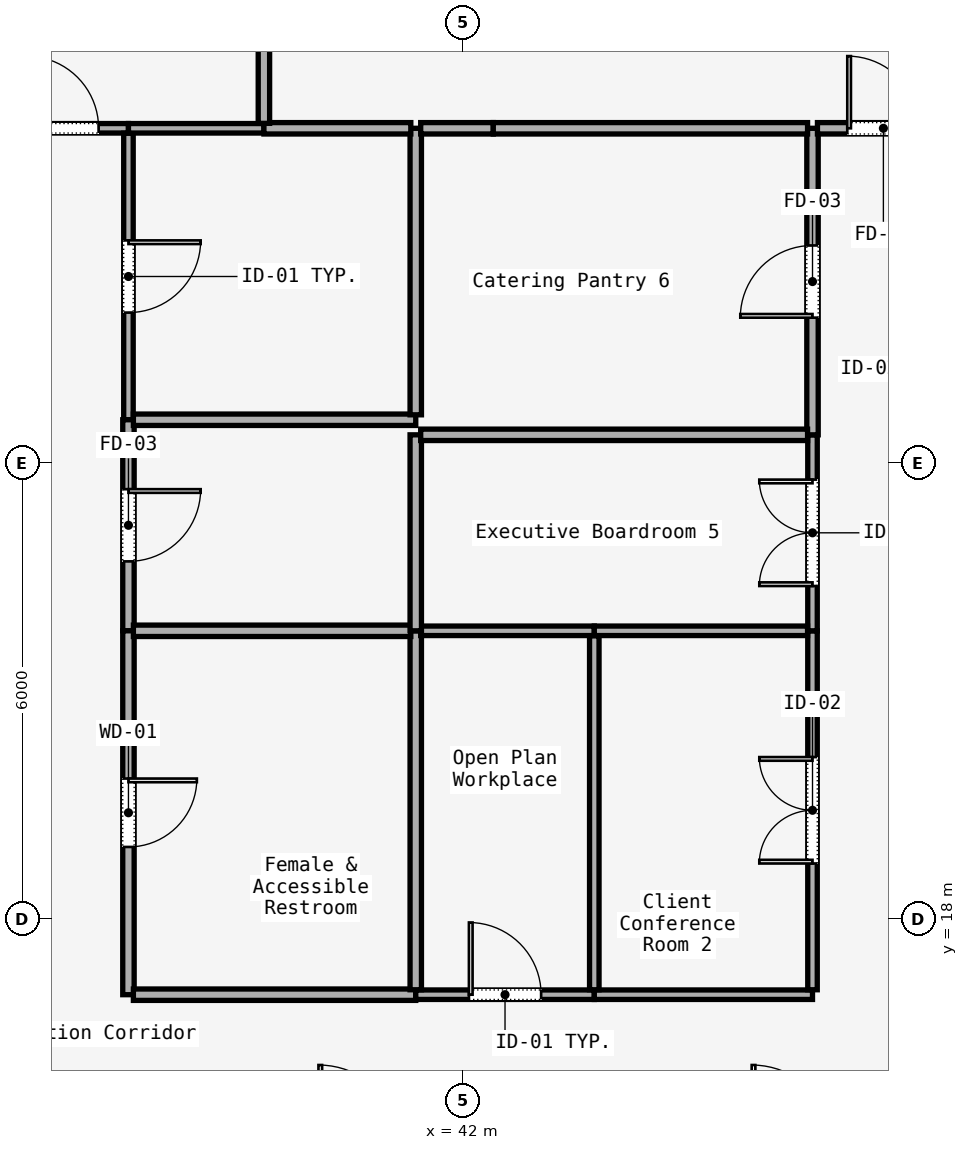
"""IFC4 building model, lengths in metres.
Left out: names, types, materials, properties, quantities, classifications, styles, units other than length and angle.
Written with IfcOpenShell. Run it as: python <this file> out.ifc"""

import sys

from ifc_helpers import new_model, si_unit, direction, frame, frame_2d, origin, place, context, subcontext, project, spatial, rectangle, extrude, element, fill, save


model = new_model("IFC4")
c1 = context("Model", 3, precision=1e-05, world=origin(), true_north=direction((0.0, 1.0)))
c2 = subcontext(c1, "Body", "Model", "MODEL_VIEW")
j1 = project(units=[si_unit("LENGTHUNIT", "METRE"), si_unit("PLANEANGLEUNIT", "RADIAN")], contexts=[c1])
p1 = place(None, origin())
s1 = spatial("IfcSite", under=j1, at=p1, CompositionType="ELEMENT")
p2 = place(p1, origin())
s2 = spatial("IfcBuilding", under=s1, at=p2, CompositionType="ELEMENT")
p3 = place(p2, frame((0.0, 0.0, 127.0)))
s3 = spatial("IfcBuildingStorey", under=s2, at=p3, CompositionType="ELEMENT", Elevation=127.0)
p4 = place(p3, frame((35.865, 28.4, 0.0), z_axis=(0.0, 0.0, 1.0), x_axis=(1.0, 0.0, 0.0)))
e1 = element("IfcWall", 1, at=p4, inside=s3, PredefinedType="PARTITIONING", context=c2, shape_type="SweptSolid", body=[
    extrude(rectangle(XDim=1.735, YDim=0.125, at=frame_2d((0.868, 0.0))), origin(), (0.0, 0.0, 1.0), 3.01),
])
p5 = place(p4, frame((0.393, 0.0, 0.0)))
e2 = element("IfcOpeningElement", 2, at=p5, cuts=e1, PredefinedType="OPENING", context=c2, shape_type="SweptSolid", body=[
    extrude(rectangle(XDim=0.95, YDim=2.2, at=frame_2d((0.475, 1.1))), frame((0.0, 0.062, 0.0), z_axis=(0.0, -1.0, 0.0), x_axis=(1.0, 0.0, 0.0)), (0.0, 0.0, 1.0), 0.125),
])
p6 = place(p3, frame((37.6, 28.335, 0.0), z_axis=(0.0, 0.0, 1.0), x_axis=(0.0, -1.0, 0.0)))
e3 = element("IfcWall", 3, at=p6, inside=s3, PredefinedType="PARTITIONING", context=c2, shape_type="SweptSolid", body=[
    extrude(rectangle(XDim=3.77, YDim=0.125, at=frame_2d((1.885, 0.0))), origin(), (0.0, 0.0, 1.0), 3.01),
])
p7 = place(p6, frame((1.41, 0.0, 0.0)))
e4 = element("IfcOpeningElement", 4, at=p7, cuts=e3, PredefinedType="OPENING", context=c2, shape_type="SweptSolid", body=[
    extrude(rectangle(XDim=0.95, YDim=2.2, at=frame_2d((0.475, 1.1))), frame((0.0, 0.062, 0.0), z_axis=(0.0, -1.0, 0.0), x_axis=(1.0, 0.0, 0.0)), (0.0, 0.0, 1.0), 0.125),
])
p8 = place(p3, frame((37.6, 24.565, 0.0), z_axis=(0.0, 0.0, 1.0), x_axis=(0.0, -1.0, 0.0)))
e5 = element("IfcWall", 5, at=p8, inside=s3, PredefinedType="PARTITIONING", context=c2, shape_type="SweptSolid", body=[
    extrude(rectangle(XDim=2.777, YDim=0.15, at=frame_2d((1.388, 0.0))), origin(), (0.0, 0.0, 1.0), 3.01),
])
p9 = place(p8, frame((0.914, 0.0, 0.0)))
e6 = element("IfcOpeningElement", 6, at=p9, cuts=e5, PredefinedType="OPENING", context=c2, shape_type="SweptSolid", body=[
    extrude(rectangle(XDim=0.95, YDim=2.2, at=frame_2d((0.475, 1.1))), frame((0.0, 0.075, 0.0), z_axis=(0.0, -1.0, 0.0), x_axis=(1.0, 0.0, 0.0)), (0.0, 0.0, 1.0), 0.15),
])
p10 = place(p3, frame((37.6, 21.788, 0.0), z_axis=(0.0, 0.0, 1.0), x_axis=(0.0, -1.0, 0.0)))
e7 = element("IfcWall", 7, at=p10, inside=s3, PredefinedType="PARTITIONING", context=c2, shape_type="SweptSolid", body=[
    extrude(rectangle(XDim=4.788, YDim=0.15, at=frame_2d((2.394, 0.0))), origin(), (0.0, 0.0, 1.0), 3.01),
])
p11 = place(p10, frame((1.944, 0.0, 0.0)))
e8 = element("IfcOpeningElement", 8, at=p11, cuts=e7, PredefinedType="OPENING", context=c2, shape_type="SweptSolid", body=[
    extrude(rectangle(XDim=0.9, YDim=2.15, at=frame_2d((0.45, 1.075))), frame((0.0, 0.075, 0.0), z_axis=(0.0, -1.0, 0.0), x_axis=(1.0, 0.0, 0.0)), (0.0, 0.0, 1.0), 0.15),
])
p12 = place(p3, frame((37.665, 17.0, 0.0), z_axis=(0.0, 0.0, 1.0), x_axis=(1.0, 0.0, 0.0)))
e9 = element("IfcWall", 9, at=p12, inside=s3, PredefinedType="PARTITIONING", context=c2, shape_type="SweptSolid", body=[
    extrude(rectangle(XDim=3.715, YDim=0.15, at=frame_2d((1.857, 0.0))), origin(), (0.0, 0.0, 1.0), 3.01),
])
p13 = place(p3, frame((41.38, 17.0, 0.0), z_axis=(0.0, 0.0, 1.0), x_axis=(1.0, 0.0, 0.0)))
e10 = element("IfcWall", 10, at=p13, inside=s3, PredefinedType="PARTITIONING", context=c2, shape_type="SweptSolid", body=[
    extrude(rectangle(XDim=2.349, YDim=0.125, at=frame_2d((1.175, 0.0))), origin(), (0.0, 0.0, 1.0), 3.01),
])
p14 = place(p13, frame((0.699, 0.0, 0.0)))
e11 = element("IfcOpeningElement", 11, at=p14, cuts=e10, PredefinedType="OPENING", context=c2, shape_type="SweptSolid", body=[
    extrude(rectangle(XDim=0.95, YDim=2.2, at=frame_2d((0.475, 1.1))), frame((0.0, 0.062, 0.0), z_axis=(0.0, -1.0, 0.0), x_axis=(1.0, 0.0, 0.0)), (0.0, 0.0, 1.0), 0.125),
])
p15 = place(p3, frame((43.729, 17.0, 0.0), z_axis=(0.0, 0.0, 1.0), x_axis=(1.0, 0.0, 0.0)))
e12 = element("IfcWall", 12, at=p15, inside=s3, PredefinedType="PARTITIONING", context=c2, shape_type="SweptSolid", body=[
    extrude(rectangle(XDim=2.871, YDim=0.125, at=frame_2d((1.436, 0.0))), origin(), (0.0, 0.0, 1.0), 3.01),
])
p16 = place(p3, frame((46.6, 17.065, 0.0), z_axis=(0.0, 0.0, 1.0), x_axis=(0.0, 1.0, 0.0)))
e13 = element("IfcWall", 13, at=p16, inside=s3, PredefinedType="PARTITIONING", context=c2, shape_type="SweptSolid", body=[
    extrude(rectangle(XDim=4.723, YDim=0.125, at=frame_2d((2.362, 0.0))), origin(), (0.0, 0.0, 1.0), 3.01),
])
p17 = place(p16, frame((1.662, 0.0, 0.0)))
e14 = element("IfcOpeningElement", 14, at=p17, cuts=e13, PredefinedType="OPENING", context=c2, shape_type="SweptSolid", body=[
    extrude(rectangle(XDim=1.4, YDim=2.2, at=frame_2d((0.7, 1.1))), frame((0.0, 0.062, 0.0), z_axis=(0.0, -1.0, 0.0), x_axis=(1.0, 0.0, 0.0)), (0.0, 0.0, 1.0), 0.125),
])
p18 = place(p3, frame((46.6, 21.788, 0.0), z_axis=(0.0, 0.0, 1.0), x_axis=(0.0, 1.0, 0.0)))
e15 = element("IfcWall", 15, at=p18, inside=s3, PredefinedType="PARTITIONING", context=c2, shape_type="SweptSolid", body=[
    extrude(rectangle(XDim=2.579, YDim=0.125, at=frame_2d((1.289, 0.0))), origin(), (0.0, 0.0, 1.0), 3.01),
])
p19 = place(p18, frame((0.589, 0.0, 0.0)))
e16 = element("IfcOpeningElement", 16, at=p19, cuts=e15, PredefinedType="OPENING", context=c2, shape_type="SweptSolid", body=[
    extrude(rectangle(XDim=1.4, YDim=2.2, at=frame_2d((0.7, 1.1))), frame((0.0, 0.062, 0.0), z_axis=(0.0, -1.0, 0.0), x_axis=(1.0, 0.0, 0.0)), (0.0, 0.0, 1.0), 0.125),
])
p20 = place(p3, frame((46.6, 24.367, 0.0), z_axis=(0.0, 0.0, 1.0), x_axis=(0.0, 1.0, 0.0)))
e17 = element("IfcWall", 17, at=p20, inside=s3, PredefinedType="PARTITIONING", context=c2, shape_type="SweptSolid", body=[
    extrude(rectangle(XDim=4.033, YDim=0.15, at=frame_2d((2.017, 0.0))), origin(), (0.0, 0.0, 1.0), 3.01),
])
p21 = place(p20, frame((1.542, 0.0, 0.0)))
e18 = element("IfcOpeningElement", 18, at=p21, cuts=e17, PredefinedType="OPENING", context=c2, shape_type="SweptSolid", body=[
    extrude(rectangle(XDim=0.95, YDim=2.2, at=frame_2d((0.475, 1.1))), frame((0.0, 0.075, 0.0), z_axis=(0.0, -1.0, 0.0), x_axis=(1.0, 0.0, 0.0)), (0.0, 0.0, 1.0), 0.15),
])
p22 = place(p3, frame((46.665, 28.4, 0.0), z_axis=(0.0, 0.0, 1.0), x_axis=(1.0, 0.0, 0.0)))
e19 = element("IfcWall", 19, at=p22, inside=s3, PredefinedType="PARTITIONING", context=c2, shape_type="SweptSolid", body=[
    extrude(rectangle(XDim=1.735, YDim=0.15, at=frame_2d((0.867, 0.0))), origin(), (0.0, 0.0, 1.0), 3.01),
])
p23 = place(p22, frame((0.393, 0.0, 0.0)))
e20 = element("IfcOpeningElement", 20, at=p23, cuts=e19, PredefinedType="OPENING", context=c2, shape_type="SweptSolid", body=[
    extrude(rectangle(XDim=0.95, YDim=2.2, at=frame_2d((0.475, 1.1))), frame((0.0, 0.075, 0.0), z_axis=(0.0, -1.0, 0.0), x_axis=(1.0, 0.0, 0.0)), (0.0, 0.0, 1.0), 0.15),
])
p24 = place(p3, frame((41.38, 21.788, 0.0), z_axis=(0.0, 0.0, 1.0), x_axis=(0.0, -1.0, 0.0)))
e21 = element("IfcWall", 21, at=p24, inside=s3, PredefinedType="PARTITIONING", context=c2, shape_type="SweptSolid", body=[
    extrude(rectangle(XDim=4.723, YDim=0.15, at=frame_2d((2.362, 0.0))), origin(), (0.0, 0.0, 1.0), 3.01),
])
p25 = place(p3, frame((37.665, 21.788, 0.0), z_axis=(0.0, 0.0, 1.0), x_axis=(1.0, 0.0, 0.0)))
e22 = element("IfcWall", 22, at=p25, inside=s3, PredefinedType="PARTITIONING", context=c2, shape_type="SweptSolid", body=[
    extrude(rectangle(XDim=3.65, YDim=0.15, at=frame_2d((1.825, 0.0))), origin(), (0.0, 0.0, 1.0), 3.01),
])
p26 = place(p3, frame((41.445, 21.788, 0.0), z_axis=(0.0, 0.0, 1.0), x_axis=(1.0, 0.0, 0.0)))
e23 = element("IfcWall", 23, at=p26, inside=s3, PredefinedType="PARTITIONING", context=c2, shape_type="SweptSolid", body=[
    extrude(rectangle(XDim=2.284, YDim=0.125, at=frame_2d((1.142, 0.0))), origin(), (0.0, 0.0, 1.0), 3.01),
])
p27 = place(p3, frame((43.729, 21.723, 0.0), z_axis=(0.0, 0.0, 1.0), x_axis=(0.0, -1.0, 0.0)))
e24 = element("IfcWall", 24, at=p27, inside=s3, PredefinedType="PARTITIONING", context=c2, shape_type="SweptSolid", body=[
    extrude(rectangle(XDim=4.658, YDim=0.125, at=frame_2d((2.329, 0.0))), origin(), (0.0, 0.0, 1.0), 3.01),
])
p28 = place(p3, frame((43.729, 21.788, 0.0), z_axis=(0.0, 0.0, 1.0), x_axis=(1.0, 0.0, 0.0)))
e25 = element("IfcWall", 25, at=p28, inside=s3, PredefinedType="PARTITIONING", context=c2, shape_type="SweptSolid", body=[
    extrude(rectangle(XDim=2.806, YDim=0.125, at=frame_2d((1.403, 0.0))), origin(), (0.0, 0.0, 1.0), 3.01),
])
p29 = place(p3, frame((41.38, 21.788, 0.0), z_axis=(0.0, 0.0, 1.0), x_axis=(0.0, 1.0, 0.0)))
e26 = element("IfcWall", 26, at=p29, inside=s3, PredefinedType="PARTITIONING", context=c2, shape_type="SweptSolid", body=[
    extrude(rectangle(XDim=2.579, YDim=0.15, at=frame_2d((1.289, 0.0))), origin(), (0.0, 0.0, 1.0), 3.01),
])
p30 = place(p3, frame((41.445, 24.367, 0.0), z_axis=(0.0, 0.0, 1.0), x_axis=(1.0, 0.0, 0.0)))
e27 = element("IfcWall", 27, at=p30, inside=s3, PredefinedType="PARTITIONING", context=c2, shape_type="SweptSolid", body=[
    extrude(rectangle(XDim=5.09, YDim=0.15, at=frame_2d((2.545, 0.0))), origin(), (0.0, 0.0, 1.0), 3.01),
])
p31 = place(p3, frame((37.665, 24.565, 0.0), z_axis=(0.0, 0.0, 1.0), x_axis=(1.0, 0.0, 0.0)))
e28 = element("IfcWall", 28, at=p31, inside=s3, PredefinedType="PARTITIONING", context=c2, shape_type="SweptSolid", body=[
    extrude(rectangle(XDim=3.715, YDim=0.15, at=frame_2d((1.857, 0.0))), origin(), (0.0, 0.0, 1.0), 3.01),
])
p32 = place(p3, frame((41.38, 24.63, 0.0), z_axis=(0.0, 0.0, 1.0), x_axis=(0.0, 1.0, 0.0)))
e29 = element("IfcWall", 29, at=p32, inside=s3, PredefinedType="PARTITIONING", context=c2, shape_type="SweptSolid", body=[
    extrude(rectangle(XDim=3.77, YDim=0.15, at=frame_2d((1.885, 0.0))), origin(), (0.0, 0.0, 1.0), 3.01),
])
p33 = place(p3, frame((41.445, 28.4, 0.0), z_axis=(0.0, 0.0, 1.0), x_axis=(1.0, 0.0, 0.0)))
e30 = element("IfcWall", 30, at=p33, inside=s3, PredefinedType="PARTITIONING", context=c2, shape_type="SweptSolid", body=[
    extrude(rectangle(XDim=0.955, YDim=0.15, at=frame_2d((0.478, 0.0))), origin(), (0.0, 0.0, 1.0), 3.01),
])
p34 = place(p3, frame((42.4, 28.4, 0.0), z_axis=(0.0, 0.0, 1.0), x_axis=(1.0, 0.0, 0.0)))
e31 = element("IfcWall", 31, at=p34, inside=s3, PredefinedType="PARTITIONING", context=c2, shape_type="SweptSolid", body=[
    extrude(rectangle(XDim=4.135, YDim=0.15, at=frame_2d((2.067, 0.0))), origin(), (0.0, 0.0, 1.0), 3.01),
])
p35 = place(p3, frame((37.6, 28.4, 0.0), z_axis=(0.0, 0.0, 1.0), x_axis=(1.0, 0.0, 0.0)))
e32 = element("IfcWall", 32, at=p35, inside=s3, PredefinedType="PARTITIONING", context=c2, shape_type="SweptSolid", body=[
    extrude(rectangle(XDim=1.782, YDim=0.125, at=frame_2d((0.891, 0.0))), origin(), (0.0, 0.0, 1.0), 3.01),
])
p36 = place(p3, frame((39.382, 28.4, 0.0), z_axis=(0.0, 0.0, 1.0), x_axis=(1.0, 0.0, 0.0)))
e33 = element("IfcWall", 33, at=p36, inside=s3, PredefinedType="PARTITIONING", context=c2, shape_type="SweptSolid", body=[
    extrude(rectangle(XDim=1.933, YDim=0.15, at=frame_2d((0.966, 0.0))), origin(), (0.0, 0.0, 1.0), 3.01),
])
p37 = place(p3, frame((39.382, 46.056, 0.0), z_axis=(0.0, 0.0, 1.0), x_axis=(0.0, -1.0, 0.0)))
e34 = element("IfcWall", 34, at=p37, inside=s3, PredefinedType="PARTITIONING", context=c2, shape_type="SweptSolid", body=[
    extrude(rectangle(XDim=17.591, YDim=0.15, at=frame_2d((8.795, 0.0))), origin(), (0.0, 0.0, 1.0), 3.01),
])
p38 = place(p11, origin())
e35 = element("IfcDoor", 35, at=p38, inside=s3, OperationType="SINGLE_SWING_RIGHT", PredefinedType="DOOR", context=c2, shape_type="SweptSolid", body=[
    extrude(rectangle(XDim=0.9, YDim=2.15, at=frame_2d((0.45, 1.075))), frame((0.0, 0.025, 0.0), z_axis=(0.0, -1.0, 0.0), x_axis=(1.0, 0.0, 0.0)), (0.0, 0.0, 1.0), 0.05),
])
fill(e8, e35)
p39 = place(p14, origin())
e36 = element("IfcDoor", 36, at=p39, inside=s3, OperationType="SINGLE_SWING_LEFT", PredefinedType="DOOR", context=c2, shape_type="SweptSolid", body=[
    extrude(rectangle(XDim=0.95, YDim=2.2, at=frame_2d((0.475, 1.1))), frame((0.0, 0.025, 0.0), z_axis=(0.0, -1.0, 0.0), x_axis=(1.0, 0.0, 0.0)), (0.0, 0.0, 1.0), 0.05),
])
fill(e11, e36)
p40 = place(p17, origin())
e37 = element("IfcDoor", 37, at=p40, inside=s3, OperationType="SINGLE_SWING_RIGHT", PredefinedType="DOOR", context=c2, shape_type="SweptSolid", body=[
    extrude(rectangle(XDim=1.4, YDim=2.2, at=frame_2d((0.7, 1.1))), frame((0.0, 0.025, 0.0), z_axis=(0.0, -1.0, 0.0), x_axis=(1.0, 0.0, 0.0)), (0.0, 0.0, 1.0), 0.05),
])
fill(e14, e37)
p41 = place(p19, origin())
e38 = element("IfcDoor", 38, at=p41, inside=s3, OperationType="SINGLE_SWING_RIGHT", PredefinedType="DOOR", context=c2, shape_type="SweptSolid", body=[
    extrude(rectangle(XDim=1.4, YDim=2.2, at=frame_2d((0.7, 1.1))), frame((0.0, 0.025, 0.0), z_axis=(0.0, -1.0, 0.0), x_axis=(1.0, 0.0, 0.0)), (0.0, 0.0, 1.0), 0.05),
])
fill(e16, e38)
p42 = place(p9, origin())
e39 = element("IfcDoor", 39, at=p42, inside=s3, OperationType="SINGLE_SWING_LEFT", PredefinedType="DOOR", context=c2, shape_type="SweptSolid", body=[
    extrude(rectangle(XDim=0.95, YDim=2.2, at=frame_2d((0.475, 1.1))), frame((0.0, 0.025, 0.0), z_axis=(0.0, -1.0, 0.0), x_axis=(1.0, 0.0, 0.0)), (0.0, 0.0, 1.0), 0.05),
])
fill(e6, e39)
p43 = place(p21, origin())
e40 = element("IfcDoor", 40, at=p43, inside=s3, OperationType="SINGLE_SWING_LEFT", PredefinedType="DOOR", context=c2, shape_type="SweptSolid", body=[
    extrude(rectangle(XDim=0.95, YDim=2.2, at=frame_2d((0.475, 1.1))), frame((0.0, 0.025, 0.0), z_axis=(0.0, -1.0, 0.0), x_axis=(1.0, 0.0, 0.0)), (0.0, 0.0, 1.0), 0.05),
])
fill(e18, e40)
p44 = place(p7, origin())
e41 = element("IfcDoor", 41, at=p44, inside=s3, OperationType="SINGLE_SWING_RIGHT", PredefinedType="DOOR", context=c2, shape_type="SweptSolid", body=[
    extrude(rectangle(XDim=0.95, YDim=2.2, at=frame_2d((0.475, 1.1))), frame((0.0, 0.025, 0.0), z_axis=(0.0, -1.0, 0.0), x_axis=(1.0, 0.0, 0.0)), (0.0, 0.0, 1.0), 0.05),
])
fill(e4, e41)
p45 = place(p5, origin())
e42 = element("IfcDoor", 42, at=p45, inside=s3, OperationType="SINGLE_SWING_RIGHT", PredefinedType="DOOR", context=c2, shape_type="SweptSolid", body=[
    extrude(rectangle(XDim=0.95, YDim=2.2, at=frame_2d((0.475, 1.1))), frame((0.0, 0.025, 0.0), z_axis=(0.0, -1.0, 0.0), x_axis=(1.0, 0.0, 0.0)), (0.0, 0.0, 1.0), 0.05),
])
fill(e2, e42)
p46 = place(p23, origin())
e43 = element("IfcDoor", 43, at=p46, inside=s3, OperationType="SINGLE_SWING_LEFT", PredefinedType="DOOR", context=c2, shape_type="SweptSolid", body=[
    extrude(rectangle(XDim=0.95, YDim=2.2, at=frame_2d((0.475, 1.1))), frame((0.0, 0.025, 0.0), z_axis=(0.0, -1.0, 0.0), x_axis=(1.0, 0.0, 0.0)), (0.0, 0.0, 1.0), 0.05),
])
fill(e20, e43)
save(model, sys.argv[1])
